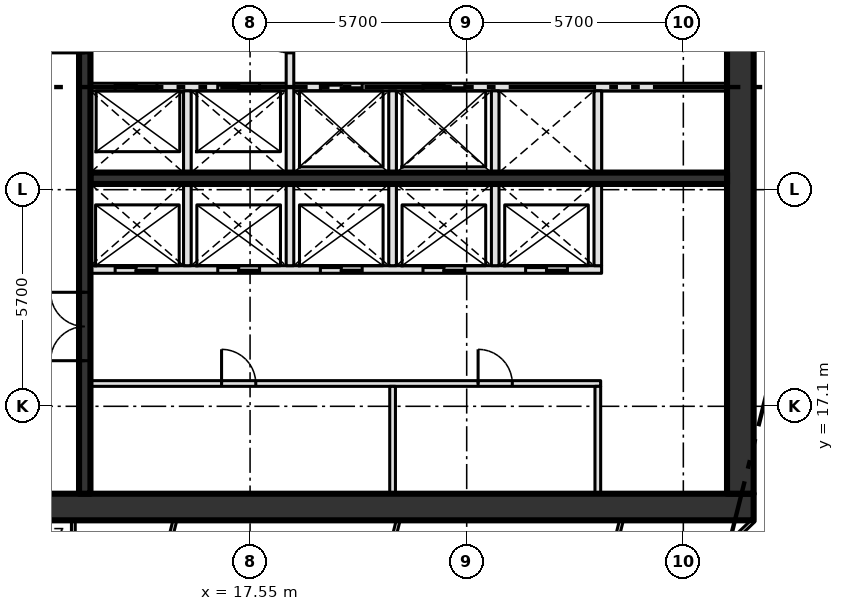
"""IFC4 building model, lengths in metres.
Left out: names, types, materials, properties, quantities, classifications, styles, units other than length and angle.
Written with IfcOpenShell. Run it as: python <this file> out.ifc"""

import sys

from ifc_helpers import new_model, si_unit, direction, frame, frame_2d, origin, place, context, subcontext, project, spatial, rectangle, extrude, element, fill, save


model = new_model("IFC4")
c1 = context("Model", 3, precision=1e-05, world=origin(), true_north=direction((0.0, 1.0)))
c2 = subcontext(c1, "Body", "Model", "MODEL_VIEW")
j1 = project(units=[si_unit("LENGTHUNIT", "METRE"), si_unit("PLANEANGLEUNIT", "RADIAN")], contexts=[c1])
p1 = place(None, origin())
s1 = spatial("IfcSite", under=j1, at=p1, CompositionType="ELEMENT")
p2 = place(p1, origin())
s2 = spatial("IfcBuilding", under=s1, at=p2, CompositionType="ELEMENT")
p3 = place(p2, frame((0.0, 0.0, 263.4)))
s3 = spatial("IfcBuildingStorey", under=s2, at=p3, CompositionType="ELEMENT", Elevation=263.4)
p4 = place(p3, frame((8.0, 14.45, -0.3), z_axis=(0.0, 0.0, 1.0), x_axis=(1.0, 0.0, 0.0)))
e1 = element("IfcWall", 1, at=p4, inside=s3, PredefinedType="SHEAR", context=c2, shape_type="SweptSolid", body=[
    extrude(rectangle(XDim=22.8, YDim=0.7, at=frame_2d((11.4, 0.0))), origin(), (0.0, 0.0, 1.0), 4.2),
])
p5 = place(p4, frame((2.3, 0.0, 0.3)))
e2 = element("IfcOpeningElement", 2, at=p5, cuts=e1, PredefinedType="OPENING", context=c2, shape_type="SweptSolid", body=[
    extrude(rectangle(XDim=1.8, YDim=2.1, at=frame_2d((0.9, 1.05))), frame((0.0, 0.36, 0.0), z_axis=(0.0, -1.0, 0.0), x_axis=(1.0, 0.0, 0.0)), (0.0, 0.0, 1.0), 0.72),
])
p6 = place(p3, frame((30.45, 14.8, -0.3), z_axis=(0.0, 0.0, 1.0), x_axis=(0.0, 1.0, 0.0)))
e3 = element("IfcWall", 3, at=p6, inside=s3, PredefinedType="SHEAR", context=c2, shape_type="SweptSolid", body=[
    extrude(rectangle(XDim=20.9, YDim=0.7, at=frame_2d((10.45, 0.0))), origin(), (0.0, 0.0, 1.0), 4.2),
])
p7 = place(p3, frame((13.35, 17.7, 0.0), z_axis=(0.0, 0.0, 1.0), x_axis=(1.0, 0.0, 0.0)))
e4 = element("IfcWall", 4, at=p7, inside=s3, PredefinedType="PARTITIONING", context=c2, shape_type="SweptSolid", body=[
    extrude(rectangle(XDim=13.425, YDim=0.15, at=frame_2d((6.712, 0.0))), origin(), (0.0, 0.0, 1.0), 3.9),
])
p8 = place(p7, frame((3.45, 0.0, 0.0)))
e5 = element("IfcOpeningElement", 5, at=p8, cuts=e4, PredefinedType="OPENING", context=c2, shape_type="SweptSolid", body=[
    extrude(rectangle(XDim=0.9, YDim=2.1, at=frame_2d((0.45, 1.05))), frame((0.0, 0.085, 0.0), z_axis=(0.0, -1.0, 0.0), x_axis=(1.0, 0.0, 0.0)), (0.0, 0.0, 1.0), 0.17),
])
p9 = place(p7, frame((10.2, 0.0, 0.0)))
e6 = element("IfcOpeningElement", 6, at=p9, cuts=e4, PredefinedType="OPENING", context=c2, shape_type="SweptSolid", body=[
    extrude(rectangle(XDim=0.9, YDim=2.1, at=frame_2d((0.45, 1.05))), frame((0.0, 0.085, 0.0), z_axis=(0.0, -1.0, 0.0), x_axis=(1.0, 0.0, 0.0)), (0.0, 0.0, 1.0), 0.17),
])
p10 = place(p3, frame((13.35, 20.7, 0.0), z_axis=(0.0, 0.0, 1.0), x_axis=(1.0, 0.0, 0.0)))
e7 = element("IfcWall", 7, at=p10, inside=s3, PredefinedType="SOLIDWALL", context=c2, shape_type="SweptSolid", body=[
    extrude(rectangle(XDim=13.45, YDim=0.2, at=frame_2d((6.725, 0.0))), origin(), (0.0, 0.0, 1.0), 3.9),
])
p11 = place(p10, frame((0.65, 0.0, 0.0)))
e8 = element("IfcOpeningElement", 8, at=p11, cuts=e7, PredefinedType="OPENING", context=c2, shape_type="SweptSolid", body=[
    extrude(rectangle(XDim=1.1, YDim=2.1, at=frame_2d((0.55, 1.05))), frame((0.0, 0.11, 0.0), z_axis=(0.0, -1.0, 0.0), x_axis=(1.0, 0.0, 0.0)), (0.0, 0.0, 1.0), 0.22),
])
p12 = place(p10, frame((3.35, 0.0, 0.0)))
e9 = element("IfcOpeningElement", 9, at=p12, cuts=e7, PredefinedType="OPENING", context=c2, shape_type="SweptSolid", body=[
    extrude(rectangle(XDim=1.1, YDim=2.1, at=frame_2d((0.55, 1.05))), frame((0.0, 0.11, 0.0), z_axis=(0.0, -1.0, 0.0), x_axis=(1.0, 0.0, 0.0)), (0.0, 0.0, 1.0), 0.22),
])
p13 = place(p10, frame((6.05, 0.0, 0.0)))
e10 = element("IfcOpeningElement", 10, at=p13, cuts=e7, PredefinedType="OPENING", context=c2, shape_type="SweptSolid", body=[
    extrude(rectangle(XDim=1.1, YDim=2.1, at=frame_2d((0.55, 1.05))), frame((0.0, 0.11, 0.0), z_axis=(0.0, -1.0, 0.0), x_axis=(1.0, 0.0, 0.0)), (0.0, 0.0, 1.0), 0.22),
])
p14 = place(p10, frame((8.75, 0.0, 0.0)))
e11 = element("IfcOpeningElement", 11, at=p14, cuts=e7, PredefinedType="OPENING", context=c2, shape_type="SweptSolid", body=[
    extrude(rectangle(XDim=1.1, YDim=2.1, at=frame_2d((0.55, 1.05))), frame((0.0, 0.11, 0.0), z_axis=(0.0, -1.0, 0.0), x_axis=(1.0, 0.0, 0.0)), (0.0, 0.0, 1.0), 0.22),
])
p15 = place(p10, frame((11.45, 0.0, 0.0)))
e12 = element("IfcOpeningElement", 12, at=p15, cuts=e7, PredefinedType="OPENING", context=c2, shape_type="SweptSolid", body=[
    extrude(rectangle(XDim=1.1, YDim=2.1, at=frame_2d((0.55, 1.05))), frame((0.0, 0.11, 0.0), z_axis=(0.0, -1.0, 0.0), x_axis=(1.0, 0.0, 0.0)), (0.0, 0.0, 1.0), 0.22),
])
p16 = place(p3, frame((13.35, 23.1, 0.0), z_axis=(0.0, 0.0, 1.0), x_axis=(1.0, 0.0, 0.0)))
e13 = element("IfcWall", 13, at=p16, inside=s3, PredefinedType="SHEAR", context=c2, shape_type="SweptSolid", body=[
    extrude(rectangle(XDim=16.75, YDim=0.3, at=frame_2d((8.375, 0.0))), origin(), (0.0, 0.0, 1.0), 3.9),
])
p17 = place(p3, frame((13.35, 25.5, 0.0), z_axis=(0.0, 0.0, 1.0), x_axis=(1.0, 0.0, 0.0)))
e14 = element("IfcWall", 14, at=p17, inside=s3, PredefinedType="SOLIDWALL", context=c2, shape_type="SweptSolid", body=[
    extrude(rectangle(XDim=16.75, YDim=0.2, at=frame_2d((8.375, 0.0))), origin(), (0.0, 0.0, 1.0), 3.9),
])
p18 = place(p17, frame((0.65, 0.0, 0.0)))
e15 = element("IfcOpeningElement", 15, at=p18, cuts=e14, PredefinedType="OPENING", context=c2, shape_type="SweptSolid", body=[
    extrude(rectangle(XDim=1.1, YDim=2.1, at=frame_2d((0.55, 1.05))), frame((0.0, 0.11, 0.0), z_axis=(0.0, -1.0, 0.0), x_axis=(1.0, 0.0, 0.0)), (0.0, 0.0, 1.0), 0.22),
])
p19 = place(p17, frame((3.35, 0.0, 0.0)))
e16 = element("IfcOpeningElement", 16, at=p19, cuts=e14, PredefinedType="OPENING", context=c2, shape_type="SweptSolid", body=[
    extrude(rectangle(XDim=1.1, YDim=2.1, at=frame_2d((0.55, 1.05))), frame((0.0, 0.11, 0.0), z_axis=(0.0, -1.0, 0.0), x_axis=(1.0, 0.0, 0.0)), (0.0, 0.0, 1.0), 0.22),
])
p20 = place(p17, frame((6.05, 0.0, 0.0)))
e17 = element("IfcOpeningElement", 17, at=p20, cuts=e14, PredefinedType="OPENING", context=c2, shape_type="SweptSolid", body=[
    extrude(rectangle(XDim=1.1, YDim=2.1, at=frame_2d((0.55, 1.05))), frame((0.0, 0.11, 0.0), z_axis=(0.0, -1.0, 0.0), x_axis=(1.0, 0.0, 0.0)), (0.0, 0.0, 1.0), 0.22),
])
p21 = place(p17, frame((8.75, 0.0, 0.0)))
e18 = element("IfcOpeningElement", 18, at=p21, cuts=e14, PredefinedType="OPENING", context=c2, shape_type="SweptSolid", body=[
    extrude(rectangle(XDim=1.1, YDim=2.1, at=frame_2d((0.55, 1.05))), frame((0.0, 0.11, 0.0), z_axis=(0.0, -1.0, 0.0), x_axis=(1.0, 0.0, 0.0)), (0.0, 0.0, 1.0), 0.22),
])
p22 = place(p3, frame((13.2, 14.8, 0.0), z_axis=(0.0, 0.0, 1.0), x_axis=(0.0, 1.0, 0.0)))
e19 = element("IfcWall", 19, at=p22, inside=s3, PredefinedType="SHEAR", context=c2, shape_type="SweptSolid", body=[
    extrude(rectangle(XDim=20.9, YDim=0.3, at=frame_2d((10.45, 0.0))), origin(), (0.0, 0.0, 1.0), 3.9),
])
p23 = place(p22, frame((3.5, 0.0, 0.0)))
e20 = element("IfcOpeningElement", 20, at=p23, cuts=e19, PredefinedType="OPENING", context=c2, shape_type="SweptSolid", body=[
    extrude(rectangle(XDim=1.8, YDim=2.1, at=frame_2d((0.9, 1.05))), frame((0.0, 0.16, 0.0), z_axis=(0.0, -1.0, 0.0), x_axis=(1.0, 0.0, 0.0)), (0.0, 0.0, 1.0), 0.32),
])
p24 = place(p22, frame((11.6, 0.0, 0.0)))
e21 = element("IfcOpeningElement", 21, at=p24, cuts=e19, PredefinedType="OPENING", context=c2, shape_type="SweptSolid", body=[
    extrude(rectangle(XDim=1.2, YDim=2.1, at=frame_2d((0.6, 1.05))), frame((0.0, 0.16, 0.0), z_axis=(0.0, -1.0, 0.0), x_axis=(1.0, 0.0, 0.0)), (0.0, 0.0, 1.0), 0.32),
])
p25 = place(p3, frame((15.9, 20.8, 0.0), z_axis=(0.0, 0.0, 1.0), x_axis=(0.0, 1.0, 0.0)))
e22 = element("IfcWall", 22, at=p25, inside=s3, PredefinedType="SOLIDWALL", context=c2, shape_type="SweptSolid", body=[
    extrude(rectangle(XDim=4.6, YDim=0.2, at=frame_2d((2.3, 0.0))), origin(), (0.0, 0.0, 1.0), 3.9),
])
p26 = place(p3, frame((18.6, 20.8, 0.0), z_axis=(0.0, 0.0, 1.0), x_axis=(0.0, 1.0, 0.0)))
e23 = element("IfcWall", 23, at=p26, inside=s3, PredefinedType="SOLIDWALL", context=c2, shape_type="SweptSolid", body=[
    extrude(rectangle(XDim=7.6, YDim=0.2, at=frame_2d((3.8, 0.0))), origin(), (0.0, 0.0, 1.0), 3.9),
])
p27 = place(p26, frame((5.6, 0.0, 0.0)))
e24 = element("IfcOpeningElement", 24, at=p27, cuts=e23, PredefinedType="OPENING", context=c2, shape_type="SweptSolid", body=[
    extrude(rectangle(XDim=1.2, YDim=2.1, at=frame_2d((0.6, 1.05))), frame((0.0, 0.11, 0.0), z_axis=(0.0, -1.0, 0.0), x_axis=(1.0, 0.0, 0.0)), (0.0, 0.0, 1.0), 0.22),
])
p28 = place(p3, frame((21.3, 14.8, 0.0), z_axis=(0.0, 0.0, 1.0), x_axis=(0.0, 1.0, 0.0)))
e25 = element("IfcWall", 25, at=p28, inside=s3, PredefinedType="PARTITIONING", context=c2, shape_type="SweptSolid", body=[
    extrude(rectangle(XDim=2.825, YDim=0.15, at=frame_2d((1.413, 0.0))), origin(), (0.0, 0.0, 1.0), 3.9),
])
for number, where, z_axis, x_axis in (
    (26, (21.3, 20.8, 0.0), (0.0, 0.0, 1.0), (0.0, 1.0, 0.0)),
    (27, (24.0, 20.8, 0.0), (0.0, 0.0, 1.0), (0.0, 1.0, 0.0)),
):
    element("IfcWall", number, at=place(p3, frame(where, z_axis=z_axis, x_axis=x_axis)), inside=s3, PredefinedType="SOLIDWALL", context=c2, shape_type="SweptSolid", body=[
        extrude(rectangle(XDim=4.6, YDim=0.2, at=frame_2d((2.3, 0.0))), origin(), (0.0, 0.0, 1.0), 3.9),
    ])
p29 = place(p3, frame((26.7, 14.8, 0.0), z_axis=(0.0, 0.0, 1.0), x_axis=(0.0, 1.0, 0.0)))
e28 = element("IfcWall", 28, at=p29, inside=s3, PredefinedType="PARTITIONING", context=c2, shape_type="SweptSolid", body=[
    extrude(rectangle(XDim=2.825, YDim=0.15, at=frame_2d((1.413, 0.0))), origin(), (0.0, 0.0, 1.0), 3.9),
])
p30 = place(p3, frame((26.7, 20.8, 0.0), z_axis=(0.0, 0.0, 1.0), x_axis=(0.0, 1.0, 0.0)))
e29 = element("IfcWall", 29, at=p30, inside=s3, PredefinedType="SOLIDWALL", context=c2, shape_type="SweptSolid", body=[
    extrude(rectangle(XDim=4.6, YDim=0.2, at=frame_2d((2.3, 0.0))), origin(), (0.0, 0.0, 1.0), 3.9),
])
p31 = place(p3, frame((12.9, 10.078, 0.0), z_axis=(0.0, 0.0, 1.0), x_axis=(0.0, 1.0, 0.0)))
e30 = element("IfcWall", 30, at=p31, inside=s3, PredefinedType="PARTITIONING", context=c2, shape_type="SweptSolid", body=[
    extrude(rectangle(XDim=4.022, YDim=0.1, at=frame_2d((2.011, 0.0))), origin(), (0.0, 0.0, 1.0), 3.9),
])
p32 = place(p31, frame((1.48, 0.0, 0.0)))
e31 = element("IfcOpeningElement", 31, at=p32, cuts=e30, PredefinedType="OPENING", context=c2, shape_type="SweptSolid", body=[
    extrude(rectangle(XDim=1.0, YDim=2.1, at=frame_2d((0.5, 1.05))), frame((0.0, 0.06, 0.0), z_axis=(0.0, -1.0, 0.0), x_axis=(1.0, 0.0, 0.0)), (0.0, 0.0, 1.0), 0.12),
])
p33 = place(p3, frame((30.8, 14.1, 0.0), z_axis=(0.0, 0.0, 1.0), x_axis=(-0.722911025189, -0.690941133281, 0.0)))
e32 = element("IfcWall", 32, at=p33, inside=s3, PredefinedType="PARTITIONING", context=c2, shape_type="SweptSolid", body=[
    extrude(rectangle(XDim=0.748, YDim=0.1, at=frame_2d((0.374, 0.0))), origin(), (0.0, 0.0, 1.0), 3.9),
])
p34 = place(p3, frame((14.34, 9.158, 0.0), z_axis=(0.0, 0.0, 1.0), x_axis=(0.241870144538, 0.970308627799, 0.0)))
e33 = element("IfcWall", 33, at=p34, inside=s3, PredefinedType="PARTITIONING", context=c2, shape_type="SweptSolid", body=[
    extrude(rectangle(XDim=5.093, YDim=0.1, at=frame_2d((2.547, 0.0))), origin(), (0.0, 0.0, 1.0), 3.9),
])
p35 = place(p3, frame((20.106, 8.721, 0.0), z_axis=(0.0, 0.0, 1.0), x_axis=(0.24190349153, 0.970300314741, 0.0)))
e34 = element("IfcWall", 34, at=p35, inside=s3, PredefinedType="PARTITIONING", context=c2, shape_type="SweptSolid", body=[
    extrude(rectangle(XDim=5.544, YDim=0.1, at=frame_2d((2.772, 0.0))), origin(), (0.0, 0.0, 1.0), 3.9),
])
p36 = place(p3, frame((25.636, 7.342, 0.0), z_axis=(0.0, 0.0, 1.0), x_axis=(0.241933497251, 0.970292833586, 0.0)))
e35 = element("IfcWall", 35, at=p36, inside=s3, PredefinedType="PARTITIONING", context=c2, shape_type="SweptSolid", body=[
    extrude(rectangle(XDim=6.965, YDim=0.1, at=frame_2d((3.482, 0.0))), origin(), (0.0, 0.0, 1.0), 3.9),
])
p37 = place(p11, origin())
e36 = element("IfcDoor", 36, at=p37, inside=s3, OperationType="SLIDING_TO_LEFT", PredefinedType="DOOR", context=c2, shape_type="SweptSolid", body=[
    extrude(rectangle(XDim=1.1, YDim=2.1, at=frame_2d((0.55, 1.05))), frame((0.0, 0.025, 0.0), z_axis=(0.0, -1.0, 0.0), x_axis=(1.0, 0.0, 0.0)), (0.0, 0.0, 1.0), 0.05),
])
fill(e8, e36)
p38 = place(p12, origin())
e37 = element("IfcDoor", 37, at=p38, inside=s3, OperationType="SLIDING_TO_LEFT", PredefinedType="DOOR", context=c2, shape_type="SweptSolid", body=[
    extrude(rectangle(XDim=1.1, YDim=2.1, at=frame_2d((0.55, 1.05))), frame((0.0, 0.025, 0.0), z_axis=(0.0, -1.0, 0.0), x_axis=(1.0, 0.0, 0.0)), (0.0, 0.0, 1.0), 0.05),
])
fill(e9, e37)
p39 = place(p13, origin())
e38 = element("IfcDoor", 38, at=p39, inside=s3, OperationType="SLIDING_TO_LEFT", PredefinedType="DOOR", context=c2, shape_type="SweptSolid", body=[
    extrude(rectangle(XDim=1.1, YDim=2.1, at=frame_2d((0.55, 1.05))), frame((0.0, 0.025, 0.0), z_axis=(0.0, -1.0, 0.0), x_axis=(1.0, 0.0, 0.0)), (0.0, 0.0, 1.0), 0.05),
])
fill(e10, e38)
p40 = place(p14, origin())
e39 = element("IfcDoor", 39, at=p40, inside=s3, OperationType="SLIDING_TO_LEFT", PredefinedType="DOOR", context=c2, shape_type="SweptSolid", body=[
    extrude(rectangle(XDim=1.1, YDim=2.1, at=frame_2d((0.55, 1.05))), frame((0.0, 0.025, 0.0), z_axis=(0.0, -1.0, 0.0), x_axis=(1.0, 0.0, 0.0)), (0.0, 0.0, 1.0), 0.05),
])
fill(e11, e39)
p41 = place(p15, origin())
e40 = element("IfcDoor", 40, at=p41, inside=s3, OperationType="SLIDING_TO_LEFT", PredefinedType="DOOR", context=c2, shape_type="SweptSolid", body=[
    extrude(rectangle(XDim=1.1, YDim=2.1, at=frame_2d((0.55, 1.05))), frame((0.0, 0.025, 0.0), z_axis=(0.0, -1.0, 0.0), x_axis=(1.0, 0.0, 0.0)), (0.0, 0.0, 1.0), 0.05),
])
fill(e12, e40)
p42 = place(p18, origin())
e41 = element("IfcDoor", 41, at=p42, inside=s3, OperationType="SLIDING_TO_LEFT", PredefinedType="DOOR", context=c2, shape_type="SweptSolid", body=[
    extrude(rectangle(XDim=1.1, YDim=2.1, at=frame_2d((0.55, 1.05))), frame((0.0, 0.025, 0.0), z_axis=(0.0, -1.0, 0.0), x_axis=(1.0, 0.0, 0.0)), (0.0, 0.0, 1.0), 0.05),
])
fill(e15, e41)
p43 = place(p19, origin())
e42 = element("IfcDoor", 42, at=p43, inside=s3, OperationType="SLIDING_TO_LEFT", PredefinedType="DOOR", context=c2, shape_type="SweptSolid", body=[
    extrude(rectangle(XDim=1.1, YDim=2.1, at=frame_2d((0.55, 1.05))), frame((0.0, 0.025, 0.0), z_axis=(0.0, -1.0, 0.0), x_axis=(1.0, 0.0, 0.0)), (0.0, 0.0, 1.0), 0.05),
])
fill(e16, e42)
p44 = place(p20, origin())
e43 = element("IfcDoor", 43, at=p44, inside=s3, OperationType="SLIDING_TO_LEFT", PredefinedType="DOOR", context=c2, shape_type="SweptSolid", body=[
    extrude(rectangle(XDim=1.1, YDim=2.1, at=frame_2d((0.55, 1.05))), frame((0.0, 0.025, 0.0), z_axis=(0.0, -1.0, 0.0), x_axis=(1.0, 0.0, 0.0)), (0.0, 0.0, 1.0), 0.05),
])
fill(e17, e43)
p45 = place(p21, origin())
e44 = element("IfcDoor", 44, at=p45, inside=s3, OperationType="SLIDING_TO_LEFT", PredefinedType="DOOR", context=c2, shape_type="SweptSolid", body=[
    extrude(rectangle(XDim=1.1, YDim=2.1, at=frame_2d((0.55, 1.05))), frame((0.0, 0.025, 0.0), z_axis=(0.0, -1.0, 0.0), x_axis=(1.0, 0.0, 0.0)), (0.0, 0.0, 1.0), 0.05),
])
fill(e18, e44)
p46 = place(p8, origin())
e45 = element("IfcDoor", 45, at=p46, inside=s3, OperationType="SINGLE_SWING_LEFT", PredefinedType="DOOR", context=c2, shape_type="SweptSolid", body=[
    extrude(rectangle(XDim=0.9, YDim=2.1, at=frame_2d((0.45, 1.05))), frame((0.0, 0.025, 0.0), z_axis=(0.0, -1.0, 0.0), x_axis=(1.0, 0.0, 0.0)), (0.0, 0.0, 1.0), 0.05),
])
fill(e5, e45)
p47 = place(p9, origin())
e46 = element("IfcDoor", 46, at=p47, inside=s3, OperationType="SINGLE_SWING_LEFT", PredefinedType="DOOR", context=c2, shape_type="SweptSolid", body=[
    extrude(rectangle(XDim=0.9, YDim=2.1, at=frame_2d((0.45, 1.05))), frame((0.0, 0.025, 0.0), z_axis=(0.0, -1.0, 0.0), x_axis=(1.0, 0.0, 0.0)), (0.0, 0.0, 1.0), 0.05),
])
fill(e6, e46)
p48 = place(p23, origin())
e47 = element("IfcDoor", 47, at=p48, inside=s3, OperationType="DOUBLE_DOOR_SINGLE_SWING", PredefinedType="DOOR", context=c2, shape_type="SweptSolid", body=[
    extrude(rectangle(XDim=1.8, YDim=2.1, at=frame_2d((0.9, 1.05))), frame((0.0, 0.025, 0.0), z_axis=(0.0, -1.0, 0.0), x_axis=(1.0, 0.0, 0.0)), (0.0, 0.0, 1.0), 0.05),
])
fill(e20, e47)
save(model, sys.argv[1])
